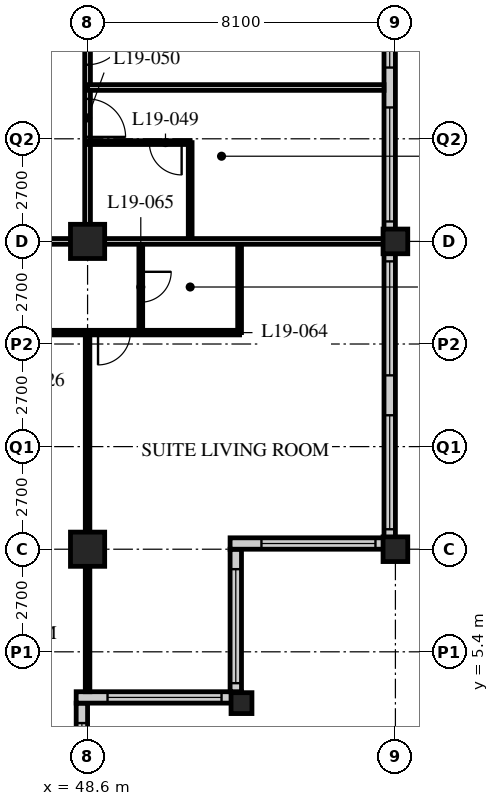
"""IFC4 building model, lengths in metres.
Left out: names, types, materials, properties, quantities, classifications, styles, units other than length and angle.
Written with IfcOpenShell. Run it as: python <this file> out.ifc"""

import sys

from ifc_helpers import new_model, si_unit, direction, frame, frame_2d, origin, origin_2d, place, context, subcontext, project, spatial, rectangle, hollow_rectangle, extrude, element, fill, save


model = new_model("IFC4")
c1 = context("Model", 3, precision=1e-05, world=origin(), true_north=direction((0.0, 1.0)))
c2 = subcontext(c1, "Body", "Model", "MODEL_VIEW")
j1 = project(units=[si_unit("LENGTHUNIT", "METRE"), si_unit("PLANEANGLEUNIT", "RADIAN")], contexts=[c1])
p1 = place(None, origin())
s1 = spatial("IfcSite", under=j1, at=p1, CompositionType="ELEMENT")
p2 = place(p1, origin())
s2 = spatial("IfcBuilding", under=s1, at=p2, CompositionType="ELEMENT")
p3 = place(p2, frame((0.0, 0.0, 77.2)))
s3 = spatial("IfcBuildingStorey", under=s2, at=p3, CompositionType="ELEMENT", Elevation=77.2)
for number, where, z_axis, x_axis in (
    (1, (48.6, 8.1, 0.0), (0.0, 0.0, 1.0), (1.0, 0.0, 0.0)),
    (2, (48.6, 16.2, 0.0), (0.0, 0.0, 1.0), (1.0, 0.0, 0.0)),
):
    element("IfcColumn", number, at=place(p3, frame(where, z_axis=z_axis, x_axis=x_axis)), inside=s3, PredefinedType="COLUMN", context=c2, shape_type="SweptSolid", body=[
        extrude(hollow_rectangle(XDim=0.9, YDim=0.9, WallThickness=0.09, at=origin_2d()), origin(), (0.0, 0.0, 1.0), 3.4),
    ])
p4 = place(p3, frame((52.65, 4.05, 0.0), z_axis=(0.0, 0.0, 1.0), x_axis=(1.0, 0.0, 0.0)))
e3 = element("IfcColumn", 3, at=p4, inside=s3, PredefinedType="COLUMN", context=c2, shape_type="SweptSolid", body=[
    extrude(hollow_rectangle(XDim=0.55, YDim=0.55, WallThickness=0.05, at=origin_2d()), origin(), (0.0, 0.0, 1.0), 3.4),
])
for number, where, z_axis, x_axis in (
    (4, (56.7, 8.1, 0.0), (0.0, 0.0, 1.0), (1.0, 0.0, 0.0)),
    (5, (56.7, 16.2, 0.0), (0.0, 0.0, 1.0), (1.0, 0.0, 0.0)),
):
    element("IfcColumn", number, at=place(p3, frame(where, z_axis=z_axis, x_axis=x_axis)), inside=s3, PredefinedType="COLUMN", context=c2, shape_type="SweptSolid", body=[
        extrude(hollow_rectangle(XDim=0.65, YDim=0.65, WallThickness=0.05, at=origin_2d()), origin(), (0.0, 0.0, 1.0), 3.4),
    ])
p5 = place(p3, frame((48.45, 0.3, 0.0), z_axis=(0.0, 0.0, 1.0), x_axis=(0.0, 1.0, 0.0)))
e6 = element("IfcWall", 6, at=p5, inside=s3, PredefinedType="SOLIDWALL", context=c2, shape_type="SweptSolid", body=[
    extrude(rectangle(XDim=3.75, YDim=0.3, at=frame_2d((1.875, 0.0))), origin(), (0.0, 0.0, 1.0), 3.19),
])
p6 = place(p5, frame((0.225, 0.0, 0.9)))
e7 = element("IfcOpeningElement", 7, at=p6, cuts=e6, PredefinedType="OPENING", context=c2, shape_type="SweptSolid", body=[
    extrude(rectangle(XDim=3.0, YDim=1.5, at=frame_2d((1.5, 0.75))), frame((0.0, 0.16, 0.0), z_axis=(0.0, -1.0, 0.0), x_axis=(1.0, 0.0, 0.0)), (0.0, 0.0, 1.0), 0.32),
])
p7 = place(p3, frame((48.3, 4.2, 0.0), z_axis=(0.0, 0.0, 1.0), x_axis=(1.0, 0.0, 0.0)))
e8 = element("IfcWall", 8, at=p7, inside=s3, PredefinedType="SOLIDWALL", context=c2, shape_type="SweptSolid", body=[
    extrude(rectangle(XDim=4.35, YDim=0.3, at=frame_2d((2.175, 0.0))), origin(), (0.0, 0.0, 1.0), 3.19),
])
p8 = place(p7, frame((0.825, 0.0, 0.9)))
e9 = element("IfcOpeningElement", 9, at=p8, cuts=e8, PredefinedType="OPENING", context=c2, shape_type="SweptSolid", body=[
    extrude(rectangle(XDim=3.0, YDim=1.5, at=frame_2d((1.5, 0.75))), frame((0.0, 0.16, 0.0), z_axis=(0.0, -1.0, 0.0), x_axis=(1.0, 0.0, 0.0)), (0.0, 0.0, 1.0), 0.32),
])
p9 = place(p3, frame((52.5, 4.35, 0.0), z_axis=(0.0, 0.0, 1.0), x_axis=(0.0, 1.0, 0.0)))
e10 = element("IfcWall", 10, at=p9, inside=s3, PredefinedType="SOLIDWALL", context=c2, shape_type="SweptSolid", body=[
    extrude(rectangle(XDim=3.75, YDim=0.3, at=frame_2d((1.875, 0.0))), origin(), (0.0, 0.0, 1.0), 3.19),
])
p10 = place(p9, frame((0.225, 0.0, 0.9)))
e11 = element("IfcOpeningElement", 11, at=p10, cuts=e10, PredefinedType="OPENING", context=c2, shape_type="SweptSolid", body=[
    extrude(rectangle(XDim=3.0, YDim=1.5, at=frame_2d((1.5, 0.75))), frame((0.0, 0.16, 0.0), z_axis=(0.0, -1.0, 0.0), x_axis=(1.0, 0.0, 0.0)), (0.0, 0.0, 1.0), 0.32),
])
p11 = place(p3, frame((52.35, 8.25, 0.0), z_axis=(0.0, 0.0, 1.0), x_axis=(1.0, 0.0, 0.0)))
e12 = element("IfcWall", 12, at=p11, inside=s3, PredefinedType="SOLIDWALL", context=c2, shape_type="SweptSolid", body=[
    extrude(rectangle(XDim=4.35, YDim=0.3, at=frame_2d((2.175, 0.0))), origin(), (0.0, 0.0, 1.0), 3.19),
])
p12 = place(p11, frame((0.825, 0.0, 0.9)))
e13 = element("IfcOpeningElement", 13, at=p12, cuts=e12, PredefinedType="OPENING", context=c2, shape_type="SweptSolid", body=[
    extrude(rectangle(XDim=3.0, YDim=1.5, at=frame_2d((1.5, 0.75))), frame((0.0, 0.16, 0.0), z_axis=(0.0, -1.0, 0.0), x_axis=(1.0, 0.0, 0.0)), (0.0, 0.0, 1.0), 0.32),
])
p13 = place(p3, frame((56.55, 8.4, 0.0), z_axis=(0.0, 0.0, 1.0), x_axis=(0.0, 1.0, 0.0)))
e14 = element("IfcWall", 14, at=p13, inside=s3, PredefinedType="SOLIDWALL", context=c2, shape_type="SweptSolid", body=[
    extrude(rectangle(XDim=32.1, YDim=0.3, at=frame_2d((16.05, 0.0))), origin(), (0.0, 0.0, 1.0), 3.19),
])
p14 = place(p13, frame((0.225, 0.0, 0.9)))
e15 = element("IfcOpeningElement", 15, at=p14, cuts=e14, PredefinedType="OPENING", context=c2, shape_type="SweptSolid", body=[
    extrude(rectangle(XDim=3.0, YDim=1.5, at=frame_2d((1.5, 0.75))), frame((0.0, 0.16, 0.0), z_axis=(0.0, -1.0, 0.0), x_axis=(1.0, 0.0, 0.0)), (0.0, 0.0, 1.0), 0.32),
])
p15 = place(p13, frame((4.275, 0.0, 0.9)))
e16 = element("IfcOpeningElement", 16, at=p15, cuts=e14, PredefinedType="OPENING", context=c2, shape_type="SweptSolid", body=[
    extrude(rectangle(XDim=3.0, YDim=1.5, at=frame_2d((1.5, 0.75))), frame((0.0, 0.16, 0.0), z_axis=(0.0, -1.0, 0.0), x_axis=(1.0, 0.0, 0.0)), (0.0, 0.0, 1.0), 0.32),
])
p16 = place(p13, frame((8.325, 0.0, 0.9)))
e17 = element("IfcOpeningElement", 17, at=p16, cuts=e14, PredefinedType="OPENING", context=c2, shape_type="SweptSolid", body=[
    extrude(rectangle(XDim=3.0, YDim=1.5, at=frame_2d((1.5, 0.75))), frame((0.0, 0.16, 0.0), z_axis=(0.0, -1.0, 0.0), x_axis=(1.0, 0.0, 0.0)), (0.0, 0.0, 1.0), 0.32),
])
p17 = place(p13, frame((12.375, 0.0, 0.9)))
e18 = element("IfcOpeningElement", 18, at=p17, cuts=e14, PredefinedType="OPENING", context=c2, shape_type="SweptSolid", body=[
    extrude(rectangle(XDim=3.0, YDim=1.5, at=frame_2d((1.5, 0.75))), frame((0.0, 0.16, 0.0), z_axis=(0.0, -1.0, 0.0), x_axis=(1.0, 0.0, 0.0)), (0.0, 0.0, 1.0), 0.32),
])
p18 = place(p13, frame((16.425, 0.0, 0.9)))
e19 = element("IfcOpeningElement", 19, at=p18, cuts=e14, PredefinedType="OPENING", context=c2, shape_type="SweptSolid", body=[
    extrude(rectangle(XDim=3.0, YDim=1.5, at=frame_2d((1.5, 0.75))), frame((0.0, 0.16, 0.0), z_axis=(0.0, -1.0, 0.0), x_axis=(1.0, 0.0, 0.0)), (0.0, 0.0, 1.0), 0.32),
])
p19 = place(p13, frame((20.475, 0.0, 0.9)))
e20 = element("IfcOpeningElement", 20, at=p19, cuts=e14, PredefinedType="OPENING", context=c2, shape_type="SweptSolid", body=[
    extrude(rectangle(XDim=3.0, YDim=1.5, at=frame_2d((1.5, 0.75))), frame((0.0, 0.16, 0.0), z_axis=(0.0, -1.0, 0.0), x_axis=(1.0, 0.0, 0.0)), (0.0, 0.0, 1.0), 0.32),
])
p20 = place(p13, frame((24.525, 0.0, 0.9)))
e21 = element("IfcOpeningElement", 21, at=p20, cuts=e14, PredefinedType="OPENING", context=c2, shape_type="SweptSolid", body=[
    extrude(rectangle(XDim=3.0, YDim=1.5, at=frame_2d((1.5, 0.75))), frame((0.0, 0.16, 0.0), z_axis=(0.0, -1.0, 0.0), x_axis=(1.0, 0.0, 0.0)), (0.0, 0.0, 1.0), 0.32),
])
p21 = place(p13, frame((28.575, 0.0, 0.9)))
e22 = element("IfcOpeningElement", 22, at=p21, cuts=e14, PredefinedType="OPENING", context=c2, shape_type="SweptSolid", body=[
    extrude(rectangle(XDim=3.0, YDim=1.5, at=frame_2d((1.5, 0.75))), frame((0.0, 0.16, 0.0), z_axis=(0.0, -1.0, 0.0), x_axis=(1.0, 0.0, 0.0)), (0.0, 0.0, 1.0), 0.32),
])
p22 = place(p3, frame((12.15, 16.2, 0.0), z_axis=(0.0, 0.0, 1.0), x_axis=(1.0, 0.0, 0.0)))
e23 = element("IfcWall", 23, at=p22, inside=s3, PredefinedType="PARTITIONING", context=c2, shape_type="SweptSolid", body=[
    extrude(rectangle(XDim=36.45, YDim=0.15, at=frame_2d((18.225, 0.0))), origin(), (0.0, 0.0, 1.0), 2.428),
])
p23 = place(p22, frame((6.5, 0.0, 0.0)))
e24 = element("IfcOpeningElement", 24, at=p23, cuts=e23, PredefinedType="OPENING", context=c2, shape_type="SweptSolid", body=[
    extrude(rectangle(XDim=1.0, YDim=2.1, at=frame_2d((0.5, 1.05))), frame((0.0, 0.085, 0.0), z_axis=(0.0, -1.0, 0.0), x_axis=(1.0, 0.0, 0.0)), (0.0, 0.0, 1.0), 0.17),
])
p24 = place(p22, frame((8.4, 0.0, 0.0)))
e25 = element("IfcOpeningElement", 25, at=p24, cuts=e23, PredefinedType="OPENING", context=c2, shape_type="SweptSolid", body=[
    extrude(rectangle(XDim=1.0, YDim=2.1, at=frame_2d((0.5, 1.05))), frame((0.0, 0.085, 0.0), z_axis=(0.0, -1.0, 0.0), x_axis=(1.0, 0.0, 0.0)), (0.0, 0.0, 1.0), 0.17),
])
p25 = place(p22, frame((14.9, 0.0, 0.0)))
e26 = element("IfcOpeningElement", 26, at=p25, cuts=e23, PredefinedType="OPENING", context=c2, shape_type="SweptSolid", body=[
    extrude(rectangle(XDim=1.0, YDim=2.1, at=frame_2d((0.5, 1.05))), frame((0.0, 0.085, 0.0), z_axis=(0.0, -1.0, 0.0), x_axis=(1.0, 0.0, 0.0)), (0.0, 0.0, 1.0), 0.17),
])
p26 = place(p22, frame((16.5, 0.0, 0.0)))
e27 = element("IfcOpeningElement", 27, at=p26, cuts=e23, PredefinedType="OPENING", context=c2, shape_type="SweptSolid", body=[
    extrude(rectangle(XDim=1.0, YDim=2.1, at=frame_2d((0.5, 1.05))), frame((0.0, 0.085, 0.0), z_axis=(0.0, -1.0, 0.0), x_axis=(1.0, 0.0, 0.0)), (0.0, 0.0, 1.0), 0.17),
])
p27 = place(p22, frame((22.7, 0.0, 0.0)))
e28 = element("IfcOpeningElement", 28, at=p27, cuts=e23, PredefinedType="OPENING", context=c2, shape_type="SweptSolid", body=[
    extrude(rectangle(XDim=1.0, YDim=2.1, at=frame_2d((0.5, 1.05))), frame((0.0, 0.085, 0.0), z_axis=(0.0, -1.0, 0.0), x_axis=(1.0, 0.0, 0.0)), (0.0, 0.0, 1.0), 0.17),
])
p28 = place(p22, frame((24.9, 0.0, 0.0)))
e29 = element("IfcOpeningElement", 29, at=p28, cuts=e23, PredefinedType="OPENING", context=c2, shape_type="SweptSolid", body=[
    extrude(rectangle(XDim=1.0, YDim=2.1, at=frame_2d((0.5, 1.05))), frame((0.0, 0.085, 0.0), z_axis=(0.0, -1.0, 0.0), x_axis=(1.0, 0.0, 0.0)), (0.0, 0.0, 1.0), 0.17),
])
p29 = place(p22, frame((30.8, 0.0, 0.0)))
e30 = element("IfcOpeningElement", 30, at=p29, cuts=e23, PredefinedType="OPENING", context=c2, shape_type="SweptSolid", body=[
    extrude(rectangle(XDim=1.0, YDim=2.1, at=frame_2d((0.5, 1.05))), frame((0.0, 0.085, 0.0), z_axis=(0.0, -1.0, 0.0), x_axis=(1.0, 0.0, 0.0)), (0.0, 0.0, 1.0), 0.17),
])
p30 = place(p22, frame((1.525, 0.0, 0.0)))
e31 = element("IfcOpeningElement", 31, at=p30, cuts=e23, PredefinedType="OPENING", context=c2, shape_type="SweptSolid", body=[
    extrude(rectangle(XDim=1.0, YDim=2.1, at=frame_2d((0.5, 1.05))), frame((0.0, 0.085, 0.0), z_axis=(0.0, -1.0, 0.0), x_axis=(1.0, 0.0, 0.0)), (0.0, 0.0, 1.0), 0.17),
])
p31 = place(p22, frame((33.925, 0.0, 0.0)))
e32 = element("IfcOpeningElement", 32, at=p31, cuts=e23, PredefinedType="OPENING", context=c2, shape_type="SweptSolid", body=[
    extrude(rectangle(XDim=1.0, YDim=2.1, at=frame_2d((0.5, 1.05))), frame((0.0, 0.085, 0.0), z_axis=(0.0, -1.0, 0.0), x_axis=(1.0, 0.0, 0.0)), (0.0, 0.0, 1.0), 0.17),
])
p32 = place(p3, frame((48.6, 16.2, 0.0), z_axis=(0.0, 0.0, 1.0), x_axis=(0.0, 1.0, 0.0)))
e33 = element("IfcWall", 33, at=p32, inside=s3, PredefinedType="PARTITIONING", context=c2, shape_type="SweptSolid", body=[
    extrude(rectangle(XDim=26.1, YDim=0.15, at=frame_2d((13.05, 0.0))), origin(), (0.0, 0.0, 1.0), 2.428),
])
p33 = place(p32, frame((2.75, 0.0, 0.0)))
e34 = element("IfcOpeningElement", 34, at=p33, cuts=e33, PredefinedType="OPENING", context=c2, shape_type="SweptSolid", body=[
    extrude(rectangle(XDim=1.0, YDim=2.1, at=frame_2d((0.5, 1.05))), frame((0.0, 0.085, 0.0), z_axis=(0.0, -1.0, 0.0), x_axis=(1.0, 0.0, 0.0)), (0.0, 0.0, 1.0), 0.17),
])
p34 = place(p32, frame((4.65, 0.0, 0.0)))
e35 = element("IfcOpeningElement", 35, at=p34, cuts=e33, PredefinedType="OPENING", context=c2, shape_type="SweptSolid", body=[
    extrude(rectangle(XDim=1.0, YDim=2.1, at=frame_2d((0.5, 1.05))), frame((0.0, 0.085, 0.0), z_axis=(0.0, -1.0, 0.0), x_axis=(1.0, 0.0, 0.0)), (0.0, 0.0, 1.0), 0.17),
])
p35 = place(p32, frame((13.55, 0.0, 0.0)))
e36 = element("IfcOpeningElement", 36, at=p35, cuts=e33, PredefinedType="OPENING", context=c2, shape_type="SweptSolid", body=[
    extrude(rectangle(XDim=1.0, YDim=2.1, at=frame_2d((0.5, 1.05))), frame((0.0, 0.085, 0.0), z_axis=(0.0, -1.0, 0.0), x_axis=(1.0, 0.0, 0.0)), (0.0, 0.0, 1.0), 0.17),
])
p36 = place(p32, frame((21.65, 0.0, 0.0)))
e37 = element("IfcOpeningElement", 37, at=p36, cuts=e33, PredefinedType="OPENING", context=c2, shape_type="SweptSolid", body=[
    extrude(rectangle(XDim=1.0, YDim=2.1, at=frame_2d((0.5, 1.05))), frame((0.0, 0.085, 0.0), z_axis=(0.0, -1.0, 0.0), x_axis=(1.0, 0.0, 0.0)), (0.0, 0.0, 1.0), 0.17),
])
p37 = place(p3, frame((51.3, 16.2, 0.0), z_axis=(0.0, 0.0, 1.0), x_axis=(0.0, 1.0, 0.0)))
e38 = element("IfcWall", 38, at=p37, inside=s3, PredefinedType="PARTITIONING", context=c2, shape_type="SweptSolid", body=[
    extrude(rectangle(XDim=2.6, YDim=0.1, at=frame_2d((1.3, 0.0))), origin(), (0.0, 0.0, 1.0), 3.19),
])
p38 = place(p3, frame((48.6, 18.8, 0.0), z_axis=(0.0, 0.0, 1.0), x_axis=(1.0, 0.0, 0.0)))
e39 = element("IfcWall", 39, at=p38, inside=s3, PredefinedType="PARTITIONING", context=c2, shape_type="SweptSolid", body=[
    extrude(rectangle(XDim=2.7, YDim=0.1, at=frame_2d((1.35, 0.0))), origin(), (0.0, 0.0, 1.0), 3.19),
])
p39 = place(p38, frame((1.625, 0.0, 0.0)))
e40 = element("IfcOpeningElement", 40, at=p39, cuts=e39, PredefinedType="OPENING", context=c2, shape_type="SweptSolid", body=[
    extrude(rectangle(XDim=0.85, YDim=2.1, at=frame_2d((0.425, 1.05))), frame((0.0, 0.06, 0.0), z_axis=(0.0, -1.0, 0.0), x_axis=(1.0, 0.0, 0.0)), (0.0, 0.0, 1.0), 0.12),
])
p40 = place(p3, frame((48.6, 20.25, 0.0), z_axis=(0.0, 0.0, 1.0), x_axis=(1.0, 0.0, 0.0)))
e41 = element("IfcWall", 41, at=p40, inside=s3, PredefinedType="PARTITIONING", context=c2, shape_type="SweptSolid", body=[
    extrude(rectangle(XDim=7.8, YDim=0.15, at=frame_2d((3.9, 0.0))), origin(), (0.0, 0.0, 1.0), 3.19),
])
p41 = place(p3, frame((44.55, 13.8, 0.0), z_axis=(0.0, 0.0, 1.0), x_axis=(1.0, 0.0, 0.0)))
e42 = element("IfcWall", 42, at=p41, inside=s3, PredefinedType="PARTITIONING", context=c2, shape_type="SweptSolid", body=[
    extrude(rectangle(XDim=8.05, YDim=0.12, at=frame_2d((4.025, 0.0))), origin(), (0.0, 0.0, 1.0), 3.19),
])
p42 = place(p41, frame((0.475, 0.0, 0.0)))
e43 = element("IfcOpeningElement", 43, at=p42, cuts=e42, PredefinedType="OPENING", context=c2, shape_type="SweptSolid", body=[
    extrude(rectangle(XDim=0.85, YDim=2.1, at=frame_2d((0.425, 1.05))), frame((0.0, 0.07, 0.0), z_axis=(0.0, -1.0, 0.0), x_axis=(1.0, 0.0, 0.0)), (0.0, 0.0, 1.0), 0.14),
])
p43 = place(p41, frame((4.325, 0.0, 0.0)))
e44 = element("IfcOpeningElement", 44, at=p43, cuts=e42, PredefinedType="OPENING", context=c2, shape_type="SweptSolid", body=[
    extrude(rectangle(XDim=0.85, YDim=2.1, at=frame_2d((0.425, 1.05))), frame((0.0, 0.07, 0.0), z_axis=(0.0, -1.0, 0.0), x_axis=(1.0, 0.0, 0.0)), (0.0, 0.0, 1.0), 0.14),
])
p44 = place(p3, frame((50.0, 16.2, 0.0), z_axis=(0.0, 0.0, 1.0), x_axis=(0.0, -1.0, 0.0)))
e45 = element("IfcWall", 45, at=p44, inside=s3, PredefinedType="PARTITIONING", context=c2, shape_type="SweptSolid", body=[
    extrude(rectangle(XDim=2.4, YDim=0.1, at=frame_2d((1.2, 0.0))), origin(), (0.0, 0.0, 1.0), 3.19),
])
p45 = place(p44, frame((0.8, 0.0, 0.0)))
e46 = element("IfcOpeningElement", 46, at=p45, cuts=e45, PredefinedType="OPENING", context=c2, shape_type="SweptSolid", body=[
    extrude(rectangle(XDim=0.8, YDim=2.1, at=frame_2d((0.4, 1.05))), frame((0.0, 0.06, 0.0), z_axis=(0.0, -1.0, 0.0), x_axis=(1.0, 0.0, 0.0)), (0.0, 0.0, 1.0), 0.12),
])
p46 = place(p3, frame((52.6, 16.2, 0.0), z_axis=(0.0, 0.0, 1.0), x_axis=(0.0, -1.0, 0.0)))
e47 = element("IfcWall", 47, at=p46, inside=s3, PredefinedType="PARTITIONING", context=c2, shape_type="SweptSolid", body=[
    extrude(rectangle(XDim=2.4, YDim=0.1, at=frame_2d((1.2, 0.0))), origin(), (0.0, 0.0, 1.0), 3.19),
])
p47 = place(p3, frame((48.6, 13.8, 0.0), z_axis=(0.0, 0.0, 1.0), x_axis=(0.0, -1.0, 0.0)))
e48 = element("IfcWall", 48, at=p47, inside=s3, PredefinedType="PARTITIONING", context=c2, shape_type="SweptSolid", body=[
    extrude(rectangle(XDim=9.45, YDim=0.12, at=frame_2d((4.725, 0.0))), origin(), (0.0, 0.0, 1.0), 2.428),
])
p48 = place(p3, frame((48.6, 16.2, 0.0), z_axis=(0.0, 0.0, 1.0), x_axis=(1.0, 0.0, 0.0)))
e49 = element("IfcWall", 49, at=p48, inside=s3, PredefinedType="PARTITIONING", context=c2, shape_type="SweptSolid", body=[
    extrude(rectangle(XDim=7.8, YDim=0.15, at=frame_2d((3.9, 0.0))), origin(), (0.0, 0.0, 1.0), 2.428),
])
p49 = place(p6, origin())
e50 = element("IfcWindow", 50, at=p49, inside=s3, PartitioningType="SINGLE_PANEL", PredefinedType="WINDOW", context=c2, shape_type="SweptSolid", body=[
    extrude(rectangle(XDim=3.0, YDim=1.5, at=frame_2d((1.5, 0.75))), frame((0.0, 0.03, 0.0), z_axis=(0.0, -1.0, 0.0), x_axis=(1.0, 0.0, 0.0)), (0.0, 0.0, 1.0), 0.06),
])
fill(e7, e50)
p50 = place(p8, origin())
e51 = element("IfcWindow", 51, at=p50, inside=s3, PartitioningType="SINGLE_PANEL", PredefinedType="WINDOW", context=c2, shape_type="SweptSolid", body=[
    extrude(rectangle(XDim=3.0, YDim=1.5, at=frame_2d((1.5, 0.75))), frame((0.0, 0.03, 0.0), z_axis=(0.0, -1.0, 0.0), x_axis=(1.0, 0.0, 0.0)), (0.0, 0.0, 1.0), 0.06),
])
fill(e9, e51)
p51 = place(p10, origin())
e52 = element("IfcWindow", 52, at=p51, inside=s3, PartitioningType="SINGLE_PANEL", PredefinedType="WINDOW", context=c2, shape_type="SweptSolid", body=[
    extrude(rectangle(XDim=3.0, YDim=1.5, at=frame_2d((1.5, 0.75))), frame((0.0, 0.03, 0.0), z_axis=(0.0, -1.0, 0.0), x_axis=(1.0, 0.0, 0.0)), (0.0, 0.0, 1.0), 0.06),
])
fill(e11, e52)
p52 = place(p12, origin())
e53 = element("IfcWindow", 53, at=p52, inside=s3, PartitioningType="SINGLE_PANEL", PredefinedType="WINDOW", context=c2, shape_type="SweptSolid", body=[
    extrude(rectangle(XDim=3.0, YDim=1.5, at=frame_2d((1.5, 0.75))), frame((0.0, 0.03, 0.0), z_axis=(0.0, -1.0, 0.0), x_axis=(1.0, 0.0, 0.0)), (0.0, 0.0, 1.0), 0.06),
])
fill(e13, e53)
p53 = place(p14, origin())
e54 = element("IfcWindow", 54, at=p53, inside=s3, PartitioningType="SINGLE_PANEL", PredefinedType="WINDOW", context=c2, shape_type="SweptSolid", body=[
    extrude(rectangle(XDim=3.0, YDim=1.5, at=frame_2d((1.5, 0.75))), frame((0.0, 0.03, 0.0), z_axis=(0.0, -1.0, 0.0), x_axis=(1.0, 0.0, 0.0)), (0.0, 0.0, 1.0), 0.06),
])
fill(e15, e54)
p54 = place(p15, origin())
e55 = element("IfcWindow", 55, at=p54, inside=s3, PartitioningType="SINGLE_PANEL", PredefinedType="WINDOW", context=c2, shape_type="SweptSolid", body=[
    extrude(rectangle(XDim=3.0, YDim=1.5, at=frame_2d((1.5, 0.75))), frame((0.0, 0.03, 0.0), z_axis=(0.0, -1.0, 0.0), x_axis=(1.0, 0.0, 0.0)), (0.0, 0.0, 1.0), 0.06),
])
fill(e16, e55)
p55 = place(p16, origin())
e56 = element("IfcWindow", 56, at=p55, inside=s3, PartitioningType="SINGLE_PANEL", PredefinedType="WINDOW", context=c2, shape_type="SweptSolid", body=[
    extrude(rectangle(XDim=3.0, YDim=1.5, at=frame_2d((1.5, 0.75))), frame((0.0, 0.03, 0.0), z_axis=(0.0, -1.0, 0.0), x_axis=(1.0, 0.0, 0.0)), (0.0, 0.0, 1.0), 0.06),
])
fill(e17, e56)
p56 = place(p17, origin())
e57 = element("IfcWindow", 57, at=p56, inside=s3, PartitioningType="SINGLE_PANEL", PredefinedType="WINDOW", context=c2, shape_type="SweptSolid", body=[
    extrude(rectangle(XDim=3.0, YDim=1.5, at=frame_2d((1.5, 0.75))), frame((0.0, 0.03, 0.0), z_axis=(0.0, -1.0, 0.0), x_axis=(1.0, 0.0, 0.0)), (0.0, 0.0, 1.0), 0.06),
])
fill(e18, e57)
p57 = place(p39, origin())
e58 = element("IfcDoor", 58, at=p57, inside=s3, OperationType="SINGLE_SWING_LEFT", PredefinedType="DOOR", context=c2, shape_type="SweptSolid", body=[
    extrude(rectangle(XDim=0.85, YDim=2.1, at=frame_2d((0.425, 1.05))), frame((0.0, 0.025, 0.0), z_axis=(0.0, -1.0, 0.0), x_axis=(1.0, 0.0, 0.0)), (0.0, 0.0, 1.0), 0.05),
])
fill(e40, e58)
p58 = place(p33, origin())
e59 = element("IfcDoor", 59, at=p58, inside=s3, OperationType="SINGLE_SWING_RIGHT", PredefinedType="DOOR", context=c2, shape_type="SweptSolid", body=[
    extrude(rectangle(XDim=1.0, YDim=2.1, at=frame_2d((0.5, 1.05))), frame((0.0, 0.025, 0.0), z_axis=(0.0, -1.0, 0.0), x_axis=(1.0, 0.0, 0.0)), (0.0, 0.0, 1.0), 0.05),
])
fill(e34, e59)
p59 = place(p34, origin())
e60 = element("IfcDoor", 60, at=p59, inside=s3, OperationType="SINGLE_SWING_LEFT", PredefinedType="DOOR", context=c2, shape_type="SweptSolid", body=[
    extrude(rectangle(XDim=1.0, YDim=2.1, at=frame_2d((0.5, 1.05))), frame((0.0, 0.025, 0.0), z_axis=(0.0, -1.0, 0.0), x_axis=(1.0, 0.0, 0.0)), (0.0, 0.0, 1.0), 0.05),
])
fill(e35, e60)
p60 = place(p45, origin())
e61 = element("IfcDoor", 61, at=p60, inside=s3, OperationType="SINGLE_SWING_LEFT", PredefinedType="DOOR", context=c2, shape_type="SweptSolid", body=[
    extrude(rectangle(XDim=0.8, YDim=2.1, at=frame_2d((0.4, 1.05))), frame((0.0, 0.025, 0.0), z_axis=(0.0, -1.0, 0.0), x_axis=(1.0, 0.0, 0.0)), (0.0, 0.0, 1.0), 0.05),
])
fill(e46, e61)
p61 = place(p43, origin())
e62 = element("IfcDoor", 62, at=p61, inside=s3, OperationType="SINGLE_SWING_RIGHT", PredefinedType="DOOR", context=c2, shape_type="SweptSolid", body=[
    extrude(rectangle(XDim=0.85, YDim=2.1, at=frame_2d((0.425, 1.05))), frame((0.0, 0.025, 0.0), z_axis=(0.0, -1.0, 0.0), x_axis=(1.0, 0.0, 0.0)), (0.0, 0.0, 1.0), 0.05),
])
fill(e44, e62)
save(model, sys.argv[1])
